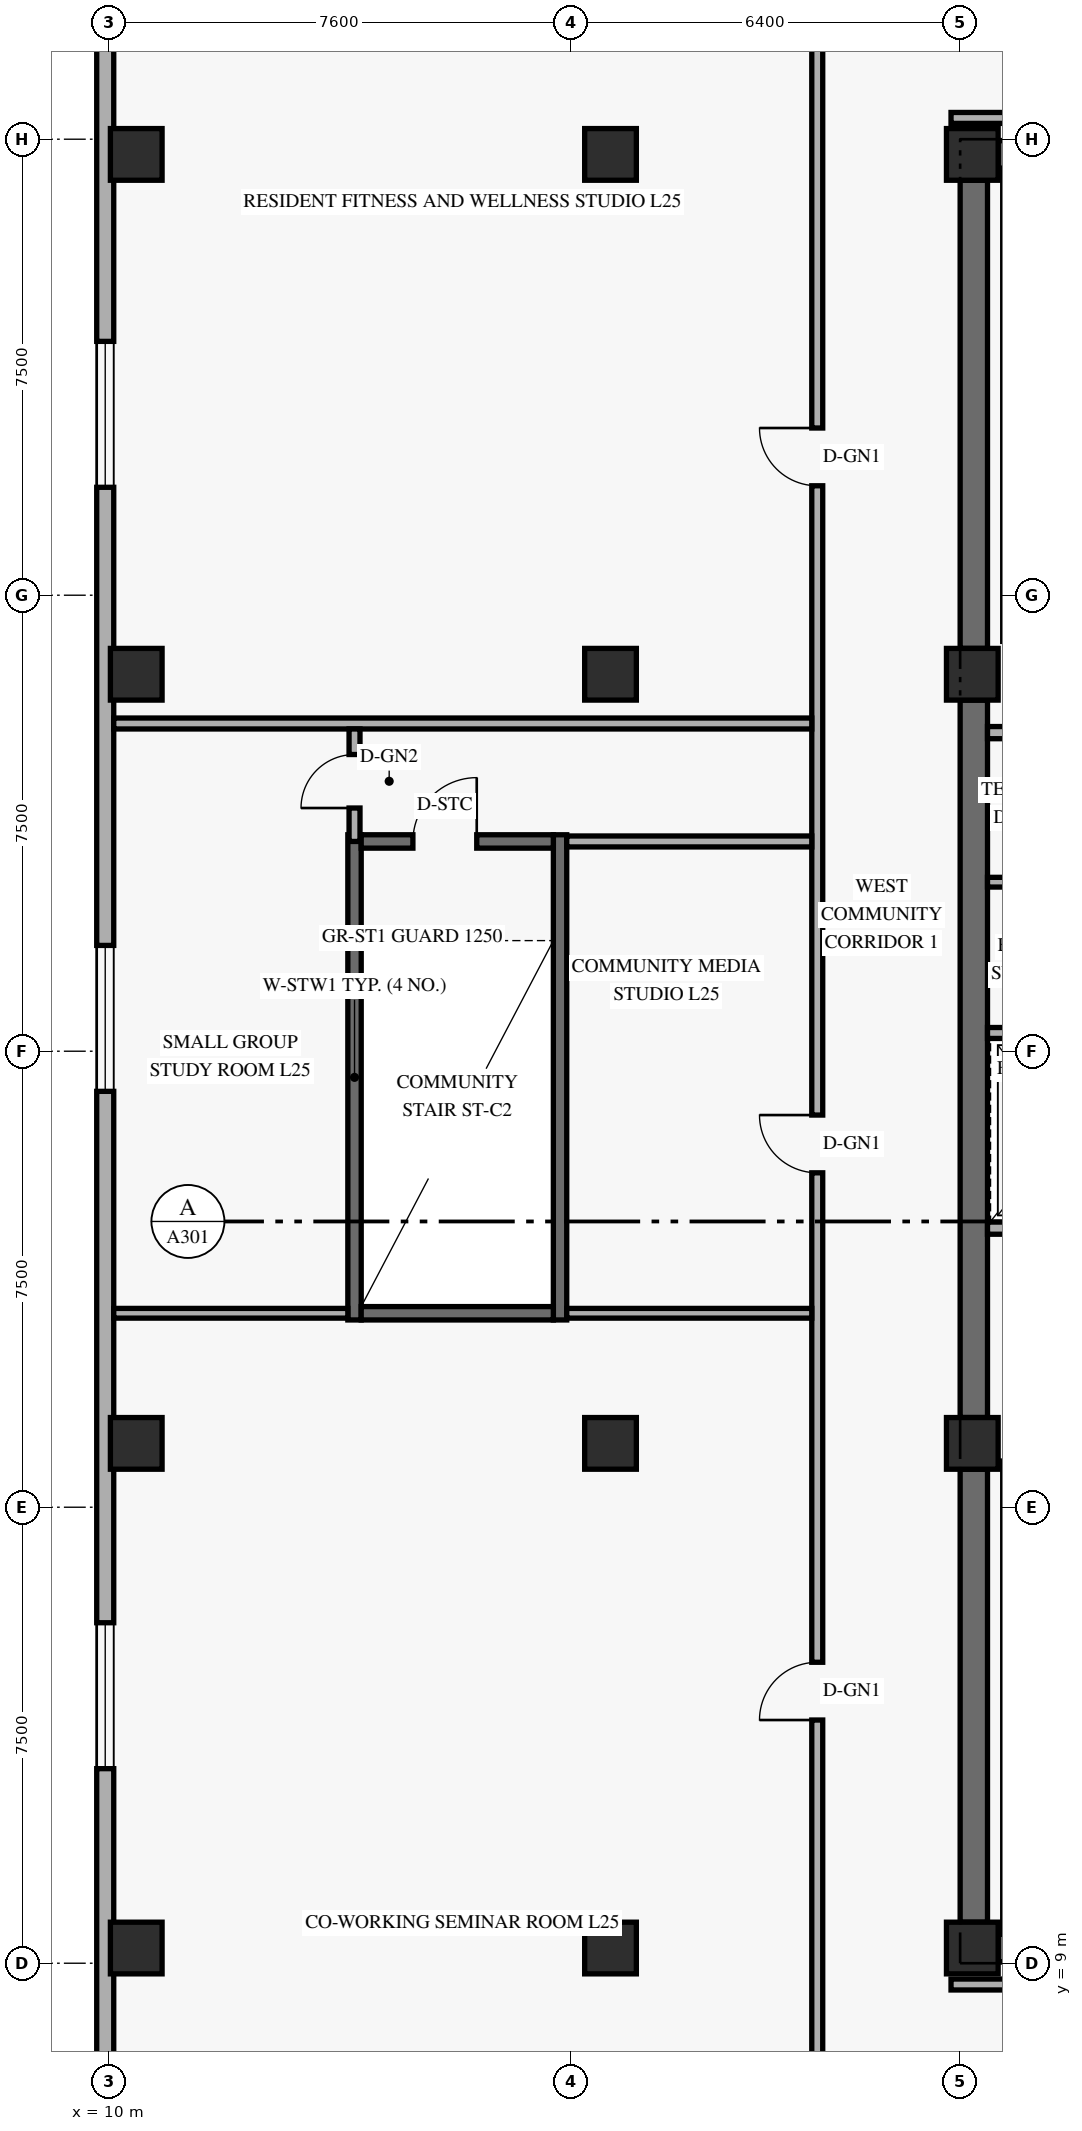
"""IFC4 building model, lengths in metres.
Left out: names, types, materials, properties, quantities, classifications, styles, units other than length and angle.
Written with IfcOpenShell. Run it as: python <this file> out.ifc"""

import sys

from ifc_helpers import new_model, si_unit, direction, frame, frame_2d, origin, origin_2d, place, context, subcontext, project, spatial, rectangle, extrude, element, fill, save


model = new_model("IFC4")
c1 = context("Model", 3, precision=1e-05, world=origin(), true_north=direction((0.0, 1.0)))
c2 = subcontext(c1, "Body", "Model", "MODEL_VIEW")
j1 = project(units=[si_unit("LENGTHUNIT", "METRE"), si_unit("PLANEANGLEUNIT", "RADIAN")], contexts=[c1])
p1 = place(None, origin())
s1 = spatial("IfcSite", under=j1, at=p1, CompositionType="ELEMENT")
p2 = place(p1, origin())
s2 = spatial("IfcBuilding", under=s1, at=p2, CompositionType="ELEMENT")
p3 = place(p2, frame((0.0, 0.0, 98.4)))
s3 = spatial("IfcBuildingStorey", under=s2, at=p3, CompositionType="ELEMENT", Elevation=98.4)
p4 = place(p3, frame((24.225, 9.675, 0.0), z_axis=(0.0, 0.0, 1.0), x_axis=(0.0, 1.0, 0.0)))
e1 = element("IfcWall", 1, at=p4, inside=s3, PredefinedType="SHEAR", context=c2, shape_type="SweptSolid", body=[
    extrude(rectangle(XDim=7.45, YDim=0.45, at=frame_2d((3.725, 0.0))), origin(), (0.0, 0.0, 1.0), 3.349),
])
p5 = place(p3, frame((24.225, 17.975, 0.0), z_axis=(0.0, 0.0, 1.0), x_axis=(0.0, 1.0, 0.0)))
e2 = element("IfcWall", 2, at=p5, inside=s3, PredefinedType="SHEAR", context=c2, shape_type="SweptSolid", body=[
    extrude(rectangle(XDim=11.8, YDim=0.45, at=frame_2d((5.9, 0.0))), origin(), (0.0, 0.0, 1.0), 3.349),
])
p6 = place(p3, frame((24.225, 30.625, 0.0), z_axis=(0.0, 0.0, 1.0), x_axis=(0.0, 1.0, 0.0)))
e3 = element("IfcWall", 3, at=p6, inside=s3, PredefinedType="SHEAR", context=c2, shape_type="SweptSolid", body=[
    extrude(rectangle(XDim=7.7, YDim=0.45, at=frame_2d((3.85, 0.0))), origin(), (0.0, 0.0, 1.0), 3.349),
])
for number, where, z_axis, x_axis in (
    (4, (24.625, 9.25, 0.0), (0.0, 0.0, 1.0), (1.0, 0.0, 0.0)),
    (5, (24.625, 38.75, 0.0), (0.0, 0.0, 1.0), (1.0, 0.0, 0.0)),
):
    element("IfcWall", number, at=place(p3, frame(where, z_axis=z_axis, x_axis=x_axis)), inside=s3, PredefinedType="SHEAR", context=c2, shape_type="SweptSolid", body=[
        extrude(rectangle(XDim=10.15, YDim=0.45, at=frame_2d((5.075, 0.0))), origin(), (0.0, 0.0, 1.0), 3.96),
    ])
for number, where, z_axis, x_axis in (
    (6, (14.04, 19.58, 0.0), (0.0, 0.0, 1.0), (0.0, 1.0, 0.0)),
    (7, (17.42, 19.58, 0.0), (0.0, 0.0, 1.0), (0.0, 1.0, 0.0)),
):
    element("IfcWall", number, at=place(p3, frame(where, z_axis=z_axis, x_axis=x_axis)), inside=s3, PredefinedType="SHEAR", context=c2, shape_type="SweptSolid", body=[
        extrude(rectangle(XDim=7.98, YDim=0.22, at=frame_2d((3.99, 0.0))), origin(), (0.0, 0.0, 1.0), 3.96),
    ])
p7 = place(p3, frame((14.15, 19.69, 0.0), z_axis=(0.0, 0.0, 1.0), x_axis=(1.0, 0.0, 0.0)))
e8 = element("IfcWall", 8, at=p7, inside=s3, PredefinedType="SHEAR", context=c2, shape_type="SweptSolid", body=[
    extrude(rectangle(XDim=3.16, YDim=0.22, at=frame_2d((1.58, 0.0))), origin(), (0.0, 0.0, 1.0), 3.96),
])
p8 = place(p3, frame((14.15, 27.45, 0.0), z_axis=(0.0, 0.0, 1.0), x_axis=(1.0, 0.0, 0.0)))
e9 = element("IfcWall", 9, at=p8, inside=s3, PredefinedType="SHEAR", context=c2, shape_type="SweptSolid", body=[
    extrude(rectangle(XDim=3.16, YDim=0.22, at=frame_2d((1.58, 0.0))), origin(), (0.0, 0.0, 1.0), 3.96),
])
p9 = place(p8, frame((0.85, 0.0, 0.0)))
e10 = element("IfcOpeningElement", 10, at=p9, cuts=e9, PredefinedType="OPENING", context=c2, shape_type="SweptSolid", body=[
    extrude(rectangle(XDim=1.05, YDim=2.15, at=frame_2d((0.525, 1.075))), frame((0.0, 0.12, 0.0), z_axis=(0.0, -1.0, 0.0), x_axis=(1.0, 0.0, 0.0)), (0.0, 0.0, 1.0), 0.24),
])
for number, where, z_axis, x_axis in (
    (11, (10.45, 9.25, 0.0), (0.0, 0.0, 1.0), (1.0, 0.0, 0.0)),
    (12, (10.45, 17.55, 0.0), (0.0, 0.0, 1.0), (1.0, 0.0, 0.0)),
    (13, (10.45, 30.2, 0.0), (0.0, 0.0, 1.0), (1.0, 0.0, 0.0)),
    (14, (10.45, 38.75, 0.0), (0.0, 0.0, 1.0), (1.0, 0.0, 0.0)),
    (15, (18.25, 9.25, 0.0), (0.0, 0.0, 1.0), (1.0, 0.0, 0.0)),
    (16, (18.25, 17.55, 0.0), (0.0, 0.0, 1.0), (1.0, 0.0, 0.0)),
    (17, (18.25, 30.2, 0.0), (0.0, 0.0, 1.0), (1.0, 0.0, 0.0)),
    (18, (18.25, 38.75, 0.0), (0.0, 0.0, 1.0), (1.0, 0.0, 0.0)),
    (19, (24.2, 9.25, 0.0), (0.0, 0.0, 1.0), (1.0, 0.0, 0.0)),
    (20, (24.2, 17.55, 0.0), (0.0, 0.0, 1.0), (1.0, 0.0, 0.0)),
    (21, (24.2, 30.2, 0.0), (0.0, 0.0, 1.0), (1.0, 0.0, 0.0)),
    (22, (24.2, 38.75, 0.0), (0.0, 0.0, 1.0), (1.0, 0.0, 0.0)),
):
    element("IfcColumn", number, at=place(p3, frame(where, z_axis=z_axis, x_axis=x_axis)), inside=s3, PredefinedType="COLUMN", context=c2, shape_type="SweptSolid", body=[
        extrude(rectangle(XDim=0.85, YDim=0.85, at=origin_2d()), origin(), (0.0, 0.0, 1.0), 4.2),
    ])
p10 = place(p3, frame((9.94, 41.68, 0.0), z_axis=(0.0, 0.0, 1.0), x_axis=(0.0, -1.0, 0.0)))
e23 = element("IfcWall", 23, at=p10, inside=s3, PredefinedType="SOLIDWALL", context=c2, shape_type="SweptSolid", body=[
    extrude(rectangle(XDim=35.36, YDim=0.28, at=frame_2d((17.68, 0.0))), origin(), (0.0, 0.0, 1.0), 3.96),
])
p11 = place(p10, frame((27.08, 0.0, 0.85)))
e24 = element("IfcOpeningElement", 24, at=p11, cuts=e23, PredefinedType="OPENING", context=c2, shape_type="SweptSolid", body=[
    extrude(rectangle(XDim=2.4, YDim=1.9, at=frame_2d((1.2, 0.95))), frame((0.0, 0.15, 0.0), z_axis=(0.0, -1.0, 0.0), x_axis=(1.0, 0.0, 0.0)), (0.0, 0.0, 1.0), 0.3),
])
p12 = place(p10, frame((15.94, 0.0, 0.85)))
e25 = element("IfcOpeningElement", 25, at=p12, cuts=e23, PredefinedType="OPENING", context=c2, shape_type="SweptSolid", body=[
    extrude(rectangle(XDim=2.4, YDim=1.9, at=frame_2d((1.2, 0.95))), frame((0.0, 0.15, 0.0), z_axis=(0.0, -1.0, 0.0), x_axis=(1.0, 0.0, 0.0)), (0.0, 0.0, 1.0), 0.3),
])
p13 = place(p10, frame((6.005, 0.0, 0.85)))
e26 = element("IfcOpeningElement", 26, at=p13, cuts=e23, PredefinedType="OPENING", context=c2, shape_type="SweptSolid", body=[
    extrude(rectangle(XDim=2.4, YDim=1.9, at=frame_2d((1.2, 0.95))), frame((0.0, 0.15, 0.0), z_axis=(0.0, -1.0, 0.0), x_axis=(1.0, 0.0, 0.0)), (0.0, 0.0, 1.0), 0.3),
])
p14 = place(p3, frame((24.45, 21.09, 0.0), z_axis=(0.0, 0.0, 1.0), x_axis=(1.0, 0.0, 0.0)))
e27 = element("IfcWall", 27, at=p14, inside=s3, PredefinedType="STANDARD", context=c2, shape_type="SweptSolid", body=[
    extrude(rectangle(XDim=6.83, YDim=0.2, at=frame_2d((3.415, 0.0))), origin(), (0.0, 0.0, 1.0), 3.96),
])
p15 = place(p14, frame((0.72, 0.0, 0.0)))
e28 = element("IfcOpeningElement", 28, at=p15, cuts=e27, PredefinedType="OPENING", context=c2, shape_type="SweptSolid", body=[
    extrude(rectangle(XDim=1.1, YDim=2.2, at=frame_2d((0.55, 1.1))), frame((0.0, 0.11, 0.0), z_axis=(0.0, -1.0, 0.0), x_axis=(1.0, 0.0, 0.0)), (0.0, 0.0, 1.0), 0.22),
])
p16 = place(p14, frame((3.32, 0.0, 0.0)))
e29 = element("IfcOpeningElement", 29, at=p16, cuts=e27, PredefinedType="OPENING", context=c2, shape_type="SweptSolid", body=[
    extrude(rectangle(XDim=1.1, YDim=2.2, at=frame_2d((0.55, 1.1))), frame((0.0, 0.11, 0.0), z_axis=(0.0, -1.0, 0.0), x_axis=(1.0, 0.0, 0.0)), (0.0, 0.0, 1.0), 0.22),
])
p17 = place(p3, frame((24.45, 24.3, 0.0), z_axis=(0.0, 0.0, 1.0), x_axis=(1.0, 0.0, 0.0)))
e30 = element("IfcWall", 30, at=p17, inside=s3, PredefinedType="STANDARD", context=c2, shape_type="SweptSolid", body=[
    extrude(rectangle(XDim=6.83, YDim=0.18, at=frame_2d((3.415, 0.0))), origin(), (0.0, 0.0, 1.0), 3.96),
])
p18 = place(p3, frame((24.45, 29.24, 0.0), z_axis=(0.0, 0.0, 1.0), x_axis=(1.0, 0.0, 0.0)))
e31 = element("IfcWall", 31, at=p18, inside=s3, PredefinedType="STANDARD", context=c2, shape_type="SweptSolid", body=[
    extrude(rectangle(XDim=3.65, YDim=0.2, at=frame_2d((1.825, 0.0))), origin(), (0.0, 0.0, 1.0), 3.96),
])
p19 = place(p3, frame((24.45, 26.78, 0.0), z_axis=(0.0, 0.0, 1.0), x_axis=(1.0, 0.0, 0.0)))
e32 = element("IfcWall", 32, at=p19, inside=s3, PredefinedType="PARTITIONING", context=c2, shape_type="SweptSolid", body=[
    extrude(rectangle(XDim=3.55, YDim=0.16, at=frame_2d((1.775, 0.0))), origin(), (0.0, 0.0, 1.0), 3.96),
])
p20 = place(p3, frame((21.65, 6.8, 0.0), z_axis=(0.0, 0.0, 1.0), x_axis=(0.0, 1.0, 0.0)))
e33 = element("IfcWall", 33, at=p20, inside=s3, PredefinedType="STANDARD", context=c2, shape_type="SweptSolid", body=[
    extrude(rectangle(XDim=34.4, YDim=0.18, at=frame_2d((17.2, 0.0))), origin(), (0.0, 0.0, 1.0), 3.331),
])
p21 = place(p20, frame((15.2, 0.0, 0.0)))
e34 = element("IfcOpeningElement", 34, at=p21, cuts=e33, PredefinedType="OPENING", context=c2, shape_type="SweptSolid", body=[
    extrude(rectangle(XDim=0.95, YDim=2.15, at=frame_2d((0.475, 1.075))), frame((0.0, 0.1, 0.0), z_axis=(0.0, -1.0, 0.0), x_axis=(1.0, 0.0, 0.0)), (0.0, 0.0, 1.0), 0.2),
])
p22 = place(p20, frame((6.2, 0.0, 0.0)))
e35 = element("IfcOpeningElement", 35, at=p22, cuts=e33, PredefinedType="OPENING", context=c2, shape_type="SweptSolid", body=[
    extrude(rectangle(XDim=0.95, YDim=2.15, at=frame_2d((0.475, 1.075))), frame((0.0, 0.1, 0.0), z_axis=(0.0, -1.0, 0.0), x_axis=(1.0, 0.0, 0.0)), (0.0, 0.0, 1.0), 0.2),
])
p23 = place(p20, frame((26.5, 0.0, 0.0)))
e36 = element("IfcOpeningElement", 36, at=p23, cuts=e33, PredefinedType="OPENING", context=c2, shape_type="SweptSolid", body=[
    extrude(rectangle(XDim=0.95, YDim=2.15, at=frame_2d((0.475, 1.075))), frame((0.0, 0.1, 0.0), z_axis=(0.0, -1.0, 0.0), x_axis=(1.0, 0.0, 0.0)), (0.0, 0.0, 1.0), 0.2),
])
for number, where, z_axis, x_axis in (
    (37, (23.85, 8.65, 0.0), (0.0, 0.0, 1.0), (1.0, 0.0, 0.0)),
    (38, (23.85, 39.35, 0.0), (0.0, 0.0, 1.0), (1.0, 0.0, 0.0)),
):
    element("IfcWall", number, at=place(p3, frame(where, z_axis=z_axis, x_axis=x_axis)), inside=s3, PredefinedType="STANDARD", context=c2, shape_type="SweptSolid", body=[
        extrude(rectangle(XDim=11.48, YDim=0.18, at=frame_2d((5.74, 0.0))), origin(), (0.0, 0.0, 1.0), 3.331),
    ])
p24 = place(p3, frame((17.53, 27.45, 0.0), z_axis=(0.0, 0.0, 1.0), x_axis=(1.0, 0.0, 0.0)))
e39 = element("IfcWall", 39, at=p24, inside=s3, PredefinedType="STANDARD", context=c2, shape_type="SweptSolid", body=[
    extrude(rectangle(XDim=4.03, YDim=0.18, at=frame_2d((2.015, 0.0))), origin(), (0.0, 0.0, 1.0), 3.331),
])
p25 = place(p3, frame((10.08, 29.39, 0.0), z_axis=(0.0, 0.0, 1.0), x_axis=(1.0, 0.0, 0.0)))
e40 = element("IfcWall", 40, at=p25, inside=s3, PredefinedType="STANDARD", context=c2, shape_type="SweptSolid", body=[
    extrude(rectangle(XDim=11.48, YDim=0.18, at=frame_2d((5.74, 0.0))), origin(), (0.0, 0.0, 1.0), 3.331),
])
p26 = place(p3, frame((14.04, 27.45, 0.0), z_axis=(0.0, 0.0, 1.0), x_axis=(0.0, 1.0, 0.0)))
e41 = element("IfcWall", 41, at=p26, inside=s3, PredefinedType="STANDARD", context=c2, shape_type="SweptSolid", body=[
    extrude(rectangle(XDim=1.85, YDim=0.18, at=frame_2d((0.925, 0.0))), origin(), (0.0, 0.0, 1.0), 3.96),
])
p27 = place(p26, frame((0.55, 0.0, 0.0)))
e42 = element("IfcOpeningElement", 42, at=p27, cuts=e41, PredefinedType="OPENING", context=c2, shape_type="SweptSolid", body=[
    extrude(rectangle(XDim=0.88, YDim=2.12, at=frame_2d((0.44, 1.06))), frame((0.0, 0.1, 0.0), z_axis=(0.0, -1.0, 0.0), x_axis=(1.0, 0.0, 0.0)), (0.0, 0.0, 1.0), 0.2),
])
p28 = place(p3, frame((10.08, 19.69, 0.0), z_axis=(0.0, 0.0, 1.0), x_axis=(1.0, 0.0, 0.0)))
e43 = element("IfcWall", 43, at=p28, inside=s3, PredefinedType="PARTITIONING", context=c2, shape_type="SweptSolid", body=[
    extrude(rectangle(XDim=3.85, YDim=0.16, at=frame_2d((1.925, 0.0))), origin(), (0.0, 0.0, 1.0), 3.409),
])
p29 = place(p3, frame((17.53, 19.69, 0.0), z_axis=(0.0, 0.0, 1.0), x_axis=(1.0, 0.0, 0.0)))
e44 = element("IfcWall", 44, at=p29, inside=s3, PredefinedType="PARTITIONING", context=c2, shape_type="SweptSolid", body=[
    extrude(rectangle(XDim=4.03, YDim=0.16, at=frame_2d((2.015, 0.0))), origin(), (0.0, 0.0, 1.0), 3.331),
])
p30 = place(p11, origin())
e45 = element("IfcWindow", 45, at=p30, inside=s3, PartitioningType="SINGLE_PANEL", PredefinedType="WINDOW", context=c2, shape_type="SweptSolid", body=[
    extrude(rectangle(XDim=2.4, YDim=1.9, at=frame_2d((1.2, 0.95))), frame((0.0, 0.03, 0.0), z_axis=(0.0, -1.0, 0.0), x_axis=(1.0, 0.0, 0.0)), (0.0, 0.0, 1.0), 0.06),
])
fill(e24, e45)
p31 = place(p12, origin())
e46 = element("IfcWindow", 46, at=p31, inside=s3, PartitioningType="SINGLE_PANEL", PredefinedType="WINDOW", context=c2, shape_type="SweptSolid", body=[
    extrude(rectangle(XDim=2.4, YDim=1.9, at=frame_2d((1.2, 0.95))), frame((0.0, 0.03, 0.0), z_axis=(0.0, -1.0, 0.0), x_axis=(1.0, 0.0, 0.0)), (0.0, 0.0, 1.0), 0.06),
])
fill(e25, e46)
p32 = place(p13, origin())
e47 = element("IfcWindow", 47, at=p32, inside=s3, PartitioningType="SINGLE_PANEL", PredefinedType="WINDOW", context=c2, shape_type="SweptSolid", body=[
    extrude(rectangle(XDim=2.4, YDim=1.9, at=frame_2d((1.2, 0.95))), frame((0.0, 0.03, 0.0), z_axis=(0.0, -1.0, 0.0), x_axis=(1.0, 0.0, 0.0)), (0.0, 0.0, 1.0), 0.06),
])
fill(e26, e47)
p33 = place(p9, frame((1.05, 0.0, 0.0), z_axis=(0.0, 0.0, 1.0), x_axis=(-1.0, 0.0, 0.0)))
e48 = element("IfcDoor", 48, at=p33, inside=s3, OperationType="SINGLE_SWING_LEFT", PredefinedType="DOOR", context=c2, shape_type="SweptSolid", body=[
    extrude(rectangle(XDim=1.05, YDim=2.15, at=frame_2d((0.525, 1.075))), frame((0.0, 0.025, 0.0), z_axis=(0.0, -1.0, 0.0), x_axis=(1.0, 0.0, 0.0)), (0.0, 0.0, 1.0), 0.05),
])
fill(e10, e48)
p34 = place(p27, origin())
e49 = element("IfcDoor", 49, at=p34, inside=s3, OperationType="SINGLE_SWING_LEFT", PredefinedType="DOOR", context=c2, shape_type="SweptSolid", body=[
    extrude(rectangle(XDim=0.88, YDim=2.12, at=frame_2d((0.44, 1.06))), frame((0.0, 0.025, 0.0), z_axis=(0.0, -1.0, 0.0), x_axis=(1.0, 0.0, 0.0)), (0.0, 0.0, 1.0), 0.05),
])
fill(e42, e49)
p35 = place(p21, origin())
e50 = element("IfcDoor", 50, at=p35, inside=s3, OperationType="SINGLE_SWING_RIGHT", PredefinedType="DOOR", context=c2, shape_type="SweptSolid", body=[
    extrude(rectangle(XDim=0.95, YDim=2.15, at=frame_2d((0.475, 1.075))), frame((0.0, 0.025, 0.0), z_axis=(0.0, -1.0, 0.0), x_axis=(1.0, 0.0, 0.0)), (0.0, 0.0, 1.0), 0.05),
])
fill(e34, e50)
p36 = place(p22, origin())
e51 = element("IfcDoor", 51, at=p36, inside=s3, OperationType="SINGLE_SWING_LEFT", PredefinedType="DOOR", context=c2, shape_type="SweptSolid", body=[
    extrude(rectangle(XDim=0.95, YDim=2.15, at=frame_2d((0.475, 1.075))), frame((0.0, 0.025, 0.0), z_axis=(0.0, -1.0, 0.0), x_axis=(1.0, 0.0, 0.0)), (0.0, 0.0, 1.0), 0.05),
])
fill(e35, e51)
p37 = place(p23, origin())
e52 = element("IfcDoor", 52, at=p37, inside=s3, OperationType="SINGLE_SWING_RIGHT", PredefinedType="DOOR", context=c2, shape_type="SweptSolid", body=[
    extrude(rectangle(XDim=0.95, YDim=2.15, at=frame_2d((0.475, 1.075))), frame((0.0, 0.025, 0.0), z_axis=(0.0, -1.0, 0.0), x_axis=(1.0, 0.0, 0.0)), (0.0, 0.0, 1.0), 0.05),
])
fill(e36, e52)
save(model, sys.argv[1])
